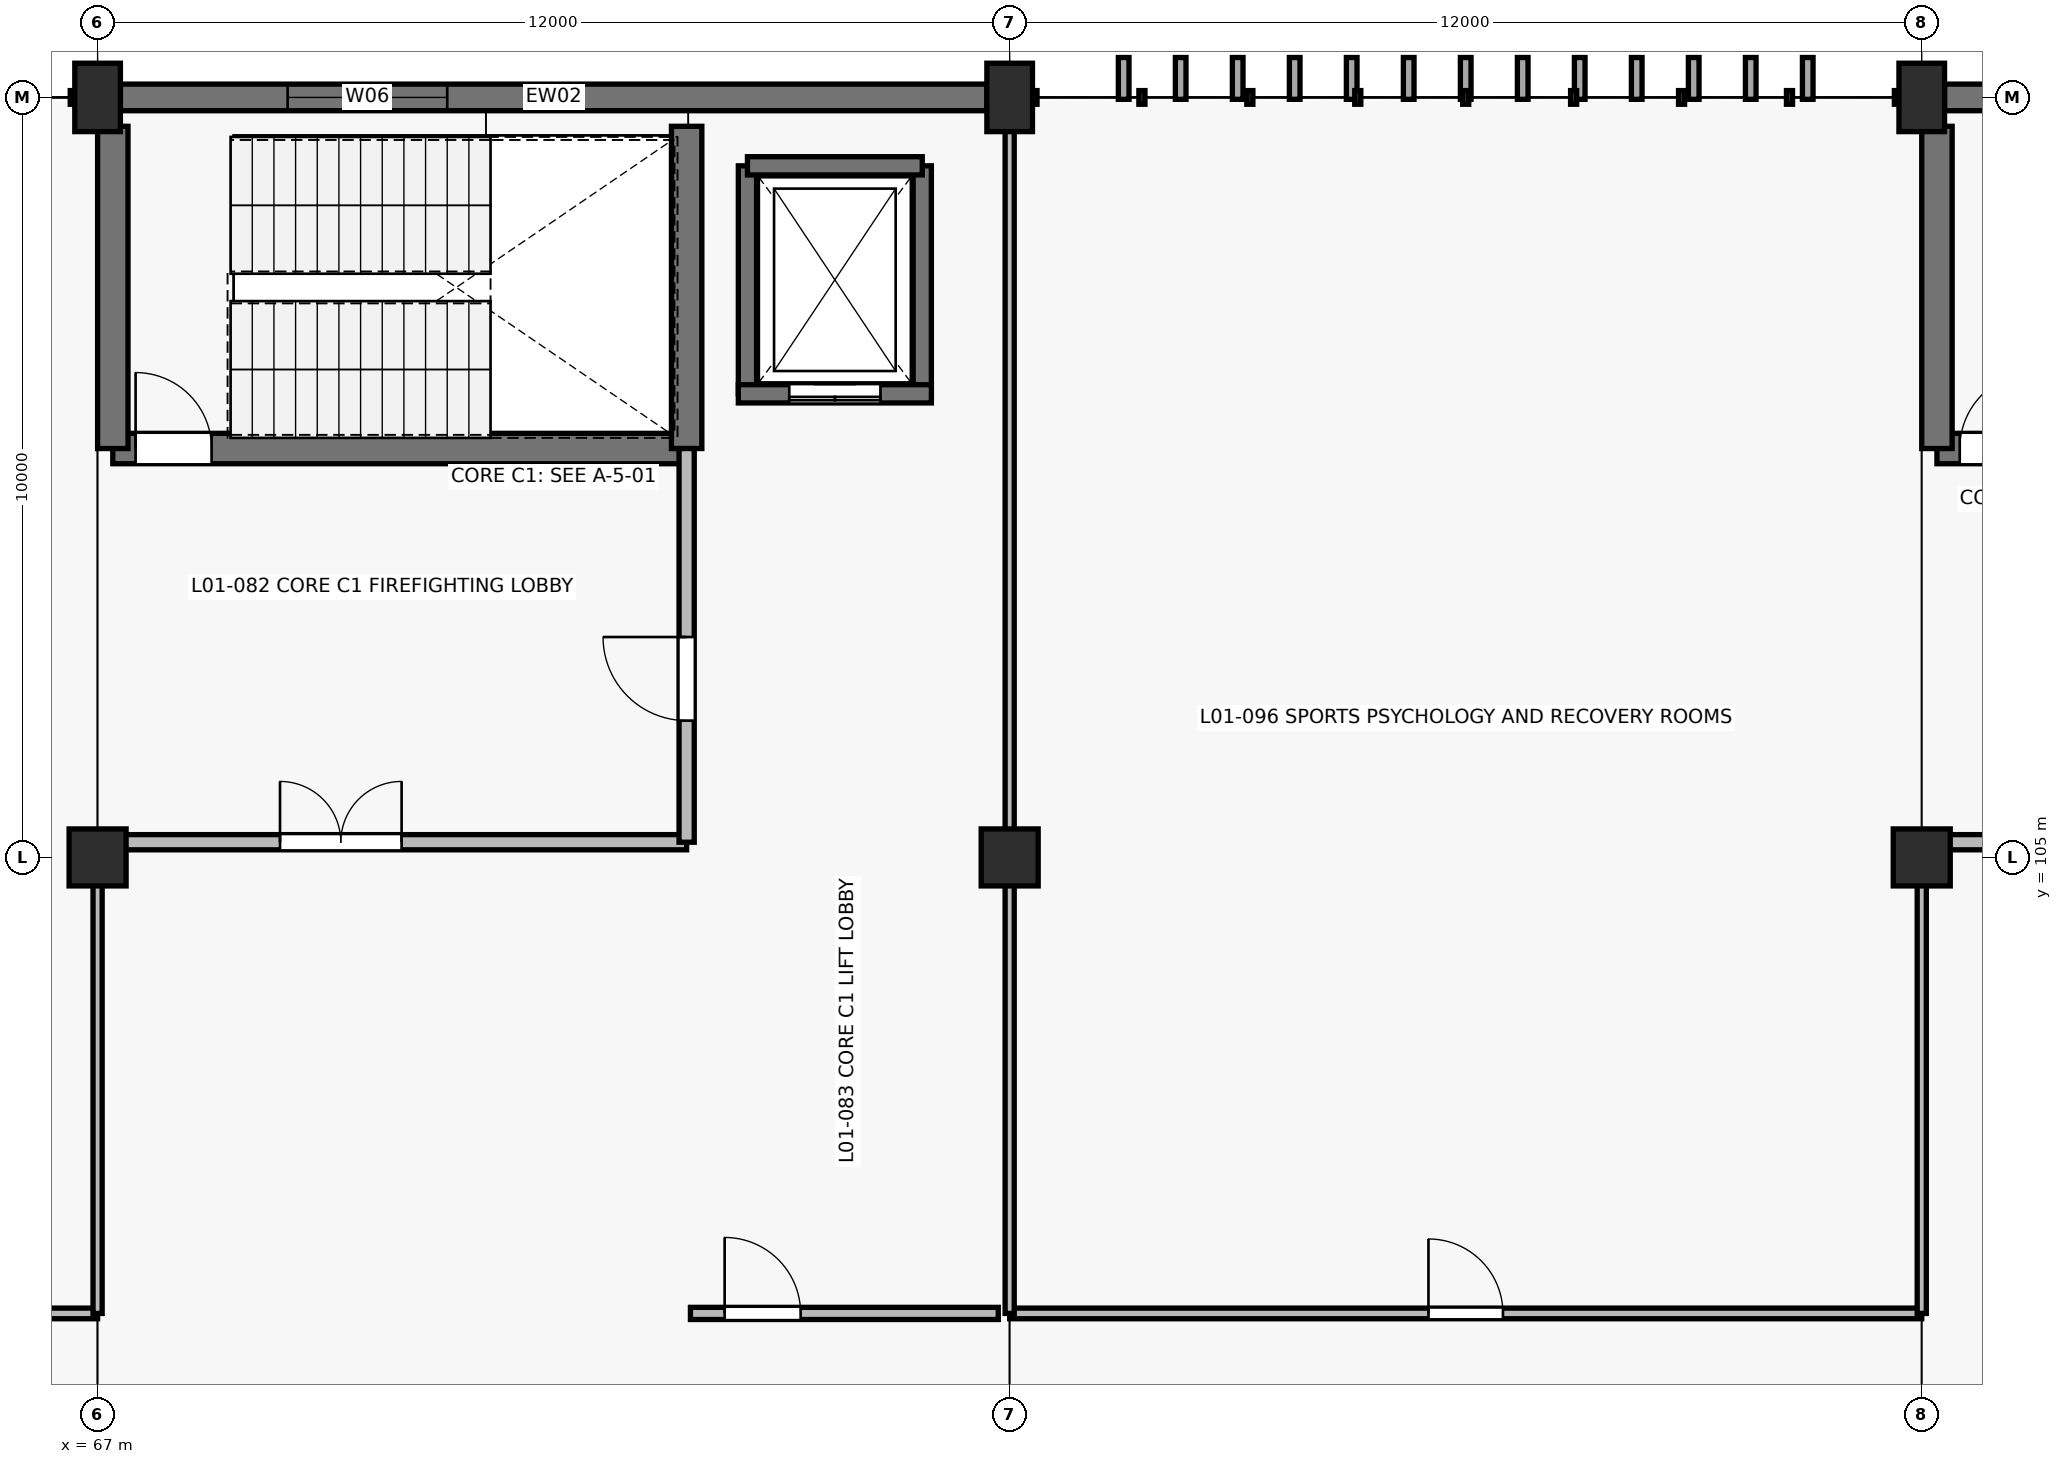
"""IFC4 building model, lengths in metres.
Left out: names, types, materials, properties, quantities, classifications, styles, units other than length and angle.
Written with IfcOpenShell. Run it as: python <this file> out.ifc"""

import sys

from ifc_helpers import new_model, si_unit, direction, frame, frame_2d, origin, origin_2d, place, context, subcontext, project, spatial, rectangle, extrude, element, fill, save


model = new_model("IFC4")
c1 = context("Model", 3, precision=1e-05, world=origin(), true_north=direction((0.0, 1.0)))
c2 = subcontext(c1, "Body", "Model", "MODEL_VIEW")
j1 = project(units=[si_unit("LENGTHUNIT", "METRE"), si_unit("PLANEANGLEUNIT", "RADIAN")], contexts=[c1])
p1 = place(None, origin())
s1 = spatial("IfcSite", under=j1, at=p1, CompositionType="ELEMENT")
p2 = place(p1, origin())
s2 = spatial("IfcBuilding", under=s1, at=p2, CompositionType="ELEMENT")
p3 = place(p2, frame((0.0, 0.0, 4.8)))
s3 = spatial("IfcBuildingStorey", under=s2, at=p3, CompositionType="ELEMENT", Elevation=4.8)
p4 = place(p3, frame((67.0, 105.0, 0.0), z_axis=(0.0, 0.0, 1.0), x_axis=(1.0, 0.0, 0.0)))
e1 = element("IfcColumn", 1, at=p4, inside=s3, PredefinedType="COLUMN", context=c2, shape_type="SweptSolid", body=[
    extrude(rectangle(XDim=0.75, YDim=0.75, at=origin_2d()), origin(), (0.0, 0.0, 1.0), 4.2),
])
p5 = place(p3, frame((67.0, 115.0, 0.0), z_axis=(0.0, 0.0, 1.0), x_axis=(1.0, 0.0, 0.0)))
e2 = element("IfcColumn", 2, at=p5, inside=s3, PredefinedType="COLUMN", context=c2, shape_type="SweptSolid", body=[
    extrude(rectangle(XDim=0.6, YDim=0.9, at=origin_2d()), origin(), (0.0, 0.0, 1.0), 4.2),
])
p6 = place(p3, frame((79.0, 105.0, 0.0), z_axis=(0.0, 0.0, 1.0), x_axis=(1.0, 0.0, 0.0)))
e3 = element("IfcColumn", 3, at=p6, inside=s3, PredefinedType="COLUMN", context=c2, shape_type="SweptSolid", body=[
    extrude(rectangle(XDim=0.75, YDim=0.75, at=origin_2d()), origin(), (0.0, 0.0, 1.0), 4.2),
])
p7 = place(p3, frame((79.0, 115.0, 0.0), z_axis=(0.0, 0.0, 1.0), x_axis=(1.0, 0.0, 0.0)))
e4 = element("IfcColumn", 4, at=p7, inside=s3, PredefinedType="COLUMN", context=c2, shape_type="SweptSolid", body=[
    extrude(rectangle(XDim=0.6, YDim=0.9, at=origin_2d()), origin(), (0.0, 0.0, 1.0), 4.2),
])
p8 = place(p3, frame((91.0, 105.0, 0.0), z_axis=(0.0, 0.0, 1.0), x_axis=(1.0, 0.0, 0.0)))
e5 = element("IfcColumn", 5, at=p8, inside=s3, PredefinedType="COLUMN", context=c2, shape_type="SweptSolid", body=[
    extrude(rectangle(XDim=0.75, YDim=0.75, at=origin_2d()), origin(), (0.0, 0.0, 1.0), 4.2),
])
p9 = place(p3, frame((91.0, 115.0, 0.0), z_axis=(0.0, 0.0, 1.0), x_axis=(1.0, 0.0, 0.0)))
e6 = element("IfcColumn", 6, at=p9, inside=s3, PredefinedType="COLUMN", context=c2, shape_type="SweptSolid", body=[
    extrude(rectangle(XDim=0.6, YDim=0.9, at=origin_2d()), origin(), (0.0, 0.0, 1.0), 4.2),
])
p10 = place(p3, frame((67.3, 115.0, 0.0), z_axis=(0.0, 0.0, 1.0), x_axis=(1.0, 0.0, 0.0)))
e7 = element("IfcWall", 7, at=p10, inside=s3, PredefinedType="SOLIDWALL", context=c2, shape_type="SweptSolid", body=[
    extrude(rectangle(XDim=11.4, YDim=0.35, at=frame_2d((5.7, 0.0))), origin(), (0.0, 0.0, 1.0), 4.2),
])
p11 = place(p10, frame((2.2, 0.0, 1.0)))
e8 = element("IfcOpeningElement", 8, at=p11, cuts=e7, PredefinedType="OPENING", context=c2, shape_type="SweptSolid", body=[
    extrude(rectangle(XDim=2.1, YDim=1.5, at=frame_2d((1.05, 0.75))), frame((0.0, 0.185, 0.0), z_axis=(0.0, -1.0, 0.0), x_axis=(1.0, 0.0, 0.0)), (0.0, 0.0, 1.0), 0.37),
])
p12 = place(p3, frame((91.3, 115.0, 0.0), z_axis=(0.0, 0.0, 1.0), x_axis=(1.0, 0.0, 0.0)))
e9 = element("IfcWall", 9, at=p12, inside=s3, PredefinedType="SOLIDWALL", context=c2, shape_type="SweptSolid", body=[
    extrude(rectangle(XDim=9.4, YDim=0.35, at=frame_2d((4.7, 0.0))), origin(), (0.0, 0.0, 1.0), 4.2),
])
p13 = place(p12, frame((2.2, 0.0, 1.0)))
e10 = element("IfcOpeningElement", 10, at=p13, cuts=e9, PredefinedType="OPENING", context=c2, shape_type="SweptSolid", body=[
    extrude(rectangle(XDim=2.7, YDim=1.5, at=frame_2d((1.35, 0.75))), frame((0.0, 0.185, 0.0), z_axis=(0.0, -1.0, 0.0), x_axis=(1.0, 0.0, 0.0)), (0.0, 0.0, 1.0), 0.37),
])
for number, where, z_axis, x_axis in (
    (11, (75.55, 111.1, 0.0), (0.0, 0.0, 1.0), (0.0, 1.0, 0.0)),
    (12, (77.85, 114.1, 0.0), (0.0, 0.0, 1.0), (0.0, -1.0, 0.0)),
):
    element("IfcWall", number, at=place(p3, frame(where, z_axis=z_axis, x_axis=x_axis)), inside=s3, PredefinedType="SHEAR", context=c2, shape_type="SweptSolid", body=[
        extrude(rectangle(XDim=3.0, YDim=0.24, at=frame_2d((1.5, 0.0))), origin(), (0.0, 0.0, 1.0), 4.2),
    ])
p14 = place(p3, frame((75.55, 114.1, 0.0), z_axis=(0.0, 0.0, 1.0), x_axis=(1.0, 0.0, 0.0)))
e13 = element("IfcWall", 13, at=p14, inside=s3, PredefinedType="SHEAR", context=c2, shape_type="SweptSolid", body=[
    extrude(rectangle(XDim=2.3, YDim=0.24, at=frame_2d((1.15, 0.0))), origin(), (0.0, 0.0, 1.0), 4.2),
])
p15 = place(p3, frame((77.97, 111.1, 0.0), z_axis=(0.0, 0.0, 1.0), x_axis=(-1.0, 0.0, 0.0)))
e14 = element("IfcWall", 14, at=p15, inside=s3, PredefinedType="SHEAR", context=c2, shape_type="SweptSolid", body=[
    extrude(rectangle(XDim=2.54, YDim=0.24, at=frame_2d((1.27, 0.0))), origin(), (0.0, 0.0, 1.0), 4.2),
])
p16 = place(p15, frame((0.67, 0.0, 0.0)))
e15 = element("IfcOpeningElement", 15, at=p16, cuts=e14, PredefinedType="OPENING", context=c2, shape_type="SweptSolid", body=[
    extrude(rectangle(XDim=1.2, YDim=2.15, at=frame_2d((0.6, 1.075))), frame((0.0, 0.13, 0.0), z_axis=(0.0, -1.0, 0.0), x_axis=(1.0, 0.0, 0.0)), (0.0, 0.0, 1.0), 0.26),
])
p17 = place(p3, frame((67.2, 110.38, 0.0), z_axis=(0.0, 0.0, 1.0), x_axis=(1.0, 0.0, 0.0)))
e16 = element("IfcWall", 16, at=p17, inside=s3, PredefinedType="SHEAR", context=c2, shape_type="SweptSolid", body=[
    extrude(rectangle(XDim=7.55, YDim=0.4, at=frame_2d((3.775, 0.0))), origin(), (0.0, 0.0, 1.0), 4.2),
])
p18 = place(p17, frame((0.3, 0.0, 0.0)))
e17 = element("IfcOpeningElement", 17, at=p18, cuts=e16, PredefinedType="OPENING", context=c2, shape_type="SweptSolid", body=[
    extrude(rectangle(XDim=1.0, YDim=2.15, at=frame_2d((0.5, 1.075))), frame((0.0, 0.21, 0.0), z_axis=(0.0, -1.0, 0.0), x_axis=(1.0, 0.0, 0.0)), (0.0, 0.0, 1.0), 0.42),
])
for number, where, z_axis, x_axis in (
    (18, (74.75, 110.38, 0.0), (0.0, 0.0, 1.0), (0.0, 1.0, 0.0)),
    (19, (67.2, 114.62, 0.0), (0.0, 0.0, 1.0), (0.0, -1.0, 0.0)),
):
    element("IfcWall", number, at=place(p3, frame(where, z_axis=z_axis, x_axis=x_axis)), inside=s3, PredefinedType="SHEAR", context=c2, shape_type="SweptSolid", body=[
        extrude(rectangle(XDim=4.24, YDim=0.4, at=frame_2d((2.12, 0.0))), origin(), (0.0, 0.0, 1.0), 4.2),
    ])
p19 = place(p3, frame((67.2, 105.2, 0.0), z_axis=(0.0, 0.0, 1.0), x_axis=(1.0, 0.0, 0.0)))
e20 = element("IfcWall", 20, at=p19, inside=s3, PredefinedType="PARTITIONING", context=c2, shape_type="SweptSolid", body=[
    extrude(rectangle(XDim=7.55, YDim=0.2, at=frame_2d((3.775, 0.0))), origin(), (0.0, 0.0, 1.0), 2.925),
])
p20 = place(p19, frame((2.2, 0.0, 0.0)))
e21 = element("IfcOpeningElement", 21, at=p20, cuts=e20, PredefinedType="OPENING", context=c2, shape_type="SweptSolid", body=[
    extrude(rectangle(XDim=1.6, YDim=2.2, at=frame_2d((0.8, 1.1))), frame((0.0, 0.11, 0.0), z_axis=(0.0, -1.0, 0.0), x_axis=(1.0, 0.0, 0.0)), (0.0, 0.0, 1.0), 0.22),
])
p21 = place(p3, frame((74.75, 105.2, 0.0), z_axis=(0.0, 0.0, 1.0), x_axis=(0.0, 1.0, 0.0)))
e22 = element("IfcWall", 22, at=p21, inside=s3, PredefinedType="PARTITIONING", context=c2, shape_type="SweptSolid", body=[
    extrude(rectangle(XDim=5.18, YDim=0.2, at=frame_2d((2.59, 0.0))), origin(), (0.0, 0.0, 1.0), 3.025),
])
p22 = place(p21, frame((1.6, 0.0, 0.0)))
e23 = element("IfcOpeningElement", 23, at=p22, cuts=e22, PredefinedType="OPENING", context=c2, shape_type="SweptSolid", body=[
    extrude(rectangle(XDim=1.1, YDim=2.15, at=frame_2d((0.55, 1.075))), frame((0.0, 0.11, 0.0), z_axis=(0.0, -1.0, 0.0), x_axis=(1.0, 0.0, 0.0)), (0.0, 0.0, 1.0), 0.22),
])
p23 = place(p3, frame((74.8, 99.0, 0.0), z_axis=(0.0, 0.0, 1.0), x_axis=(1.0, 0.0, 0.0)))
e24 = element("IfcWall", 24, at=p23, inside=s3, PredefinedType="PARTITIONING", context=c2, shape_type="SweptSolid", body=[
    extrude(rectangle(XDim=4.05, YDim=0.16, at=frame_2d((2.025, 0.0))), origin(), (0.0, 0.0, 1.0), 2.925),
])
p24 = place(p23, frame((0.45, 0.0, 0.0)))
e25 = element("IfcOpeningElement", 25, at=p24, cuts=e24, PredefinedType="OPENING", context=c2, shape_type="SweptSolid", body=[
    extrude(rectangle(XDim=1.0, YDim=2.15, at=frame_2d((0.5, 1.075))), frame((0.0, 0.09, 0.0), z_axis=(0.0, -1.0, 0.0), x_axis=(1.0, 0.0, 0.0)), (0.0, 0.0, 1.0), 0.18),
])
p25 = place(p3, frame((91.2, 110.38, 0.0), z_axis=(0.0, 0.0, 1.0), x_axis=(1.0, 0.0, 0.0)))
e26 = element("IfcWall", 26, at=p25, inside=s3, PredefinedType="SHEAR", context=c2, shape_type="SweptSolid", body=[
    extrude(rectangle(XDim=7.1, YDim=0.4, at=frame_2d((3.55, 0.0))), origin(), (0.0, 0.0, 1.0), 4.2),
])
p26 = place(p25, frame((0.3, 0.0, 0.0)))
e27 = element("IfcOpeningElement", 27, at=p26, cuts=e26, PredefinedType="OPENING", context=c2, shape_type="SweptSolid", body=[
    extrude(rectangle(XDim=1.0, YDim=2.15, at=frame_2d((0.5, 1.075))), frame((0.0, 0.21, 0.0), z_axis=(0.0, -1.0, 0.0), x_axis=(1.0, 0.0, 0.0)), (0.0, 0.0, 1.0), 0.42),
])
p27 = place(p3, frame((91.2, 114.62, 0.0), z_axis=(0.0, 0.0, 1.0), x_axis=(0.0, -1.0, 0.0)))
e28 = element("IfcWall", 28, at=p27, inside=s3, PredefinedType="SHEAR", context=c2, shape_type="SweptSolid", body=[
    extrude(rectangle(XDim=4.24, YDim=0.4, at=frame_2d((2.12, 0.0))), origin(), (0.0, 0.0, 1.0), 4.2),
])
p28 = place(p3, frame((91.2, 105.2, 0.0), z_axis=(0.0, 0.0, 1.0), x_axis=(1.0, 0.0, 0.0)))
e29 = element("IfcWall", 29, at=p28, inside=s3, PredefinedType="PARTITIONING", context=c2, shape_type="SweptSolid", body=[
    extrude(rectangle(XDim=7.1, YDim=0.2, at=frame_2d((3.55, 0.0))), origin(), (0.0, 0.0, 1.0), 2.925),
])
p29 = place(p28, frame((2.2, 0.0, 0.0)))
e30 = element("IfcOpeningElement", 30, at=p29, cuts=e29, PredefinedType="OPENING", context=c2, shape_type="SweptSolid", body=[
    extrude(rectangle(XDim=1.6, YDim=2.2, at=frame_2d((0.8, 1.1))), frame((0.0, 0.11, 0.0), z_axis=(0.0, -1.0, 0.0), x_axis=(1.0, 0.0, 0.0)), (0.0, 0.0, 1.0), 0.22),
])
p30 = place(p3, frame((43.18, 99.0, 0.0), z_axis=(0.0, 0.0, 1.0), x_axis=(1.0, 0.0, 0.0)))
e31 = element("IfcWall", 31, at=p30, inside=s3, PredefinedType="PARTITIONING", context=c2, shape_type="SweptSolid", body=[
    extrude(rectangle(XDim=23.82, YDim=0.14, at=frame_2d((11.91, 0.0))), origin(), (0.0, 0.0, 1.0), 2.925),
])
p31 = place(p30, frame((11.01, 0.0, 0.0)))
e32 = element("IfcOpeningElement", 32, at=p31, cuts=e31, PredefinedType="OPENING", context=c2, shape_type="SweptSolid", body=[
    extrude(rectangle(XDim=1.8, YDim=2.25, at=frame_2d((0.9, 1.125))), frame((0.0, 0.08, 0.0), z_axis=(0.0, -1.0, 0.0), x_axis=(1.0, 0.0, 0.0)), (0.0, 0.0, 1.0), 0.16),
])
p32 = place(p3, frame((67.0, 99.0, 0.0), z_axis=(0.0, 0.0, 1.0), x_axis=(0.0, 1.0, 0.0)))
e33 = element("IfcWall", 33, at=p32, inside=s3, PredefinedType="PARTITIONING", context=c2, shape_type="SweptSolid", body=[
    extrude(rectangle(XDim=6.2, YDim=0.12, at=frame_2d((3.1, 0.0))), origin(), (0.0, 0.0, 1.0), 2.925),
])
p33 = place(p3, frame((79.0, 99.0, 0.0), z_axis=(0.0, 0.0, 1.0), x_axis=(1.0, 0.0, 0.0)))
e34 = element("IfcWall", 34, at=p33, inside=s3, PredefinedType="PARTITIONING", context=c2, shape_type="SweptSolid", body=[
    extrude(rectangle(XDim=12.0, YDim=0.14, at=frame_2d((6.0, 0.0))), origin(), (0.0, 0.0, 1.0), 2.925),
])
p34 = place(p33, frame((5.51, 0.0, 0.0)))
e35 = element("IfcOpeningElement", 35, at=p34, cuts=e34, PredefinedType="OPENING", context=c2, shape_type="SweptSolid", body=[
    extrude(rectangle(XDim=0.98, YDim=2.1, at=frame_2d((0.49, 1.05))), frame((0.0, 0.08, 0.0), z_axis=(0.0, -1.0, 0.0), x_axis=(1.0, 0.0, 0.0)), (0.0, 0.0, 1.0), 0.16),
])
p35 = place(p3, frame((79.0, 99.0, 0.0), z_axis=(0.0, 0.0, 1.0), x_axis=(0.0, 1.0, 0.0)))
e36 = element("IfcWall", 36, at=p35, inside=s3, PredefinedType="PARTITIONING", context=c2, shape_type="SweptSolid", body=[
    extrude(rectangle(XDim=15.75, YDim=0.12, at=frame_2d((7.875, 0.0))), origin(), (0.0, 0.0, 1.0), 2.925),
])
p36 = place(p3, frame((91.0, 99.0, 0.0), z_axis=(0.0, 0.0, 1.0), x_axis=(0.0, 1.0, 0.0)))
e37 = element("IfcWall", 37, at=p36, inside=s3, PredefinedType="PARTITIONING", context=c2, shape_type="SweptSolid", body=[
    extrude(rectangle(XDim=6.2, YDim=0.12, at=frame_2d((3.1, 0.0))), origin(), (0.0, 0.0, 1.0), 2.925),
])
p37 = place(p11, origin())
e38 = element("IfcWindow", 38, at=p37, inside=s3, PartitioningType="DOUBLE_PANEL_VERTICAL", PredefinedType="WINDOW", context=c2, shape_type="SweptSolid", body=[
    extrude(rectangle(XDim=2.1, YDim=1.5, at=frame_2d((1.05, 0.75))), frame((0.0, 0.03, 0.0), z_axis=(0.0, -1.0, 0.0), x_axis=(1.0, 0.0, 0.0)), (0.0, 0.0, 1.0), 0.06),
])
fill(e8, e38)
p38 = place(p16, origin())
e39 = element("IfcDoor", 39, at=p38, inside=s3, OperationType="DOUBLE_DOOR_SLIDING", PredefinedType="USERDEFINED", context=c2, shape_type="SweptSolid", body=[
    extrude(rectangle(XDim=1.2, YDim=2.15, at=frame_2d((0.6, 1.075))), frame((0.0, 0.025, 0.0), z_axis=(0.0, -1.0, 0.0), x_axis=(1.0, 0.0, 0.0)), (0.0, 0.0, 1.0), 0.05),
])
fill(e15, e39)
p39 = place(p18, origin())
e40 = element("IfcDoor", 40, at=p39, inside=s3, OperationType="SINGLE_SWING_LEFT", PredefinedType="DOOR", context=c2, shape_type="SweptSolid", body=[
    extrude(rectangle(XDim=1.0, YDim=2.15, at=frame_2d((0.5, 1.075))), frame((0.0, 0.025, 0.0), z_axis=(0.0, -1.0, 0.0), x_axis=(1.0, 0.0, 0.0)), (0.0, 0.0, 1.0), 0.05),
])
fill(e17, e40)
p40 = place(p20, origin())
e41 = element("IfcDoor", 41, at=p40, inside=s3, OperationType="DOUBLE_DOOR_SINGLE_SWING", PredefinedType="DOOR", context=c2, shape_type="SweptSolid", body=[
    extrude(rectangle(XDim=1.6, YDim=2.2, at=frame_2d((0.8, 1.1))), frame((0.0, 0.025, 0.0), z_axis=(0.0, -1.0, 0.0), x_axis=(1.0, 0.0, 0.0)), (0.0, 0.0, 1.0), 0.05),
])
fill(e21, e41)
p41 = place(p22, origin())
e42 = element("IfcDoor", 42, at=p41, inside=s3, OperationType="SINGLE_SWING_RIGHT", PredefinedType="DOOR", context=c2, shape_type="SweptSolid", body=[
    extrude(rectangle(XDim=1.1, YDim=2.15, at=frame_2d((0.55, 1.075))), frame((0.0, 0.025, 0.0), z_axis=(0.0, -1.0, 0.0), x_axis=(1.0, 0.0, 0.0)), (0.0, 0.0, 1.0), 0.05),
])
fill(e23, e42)
p42 = place(p24, origin())
e43 = element("IfcDoor", 43, at=p42, inside=s3, OperationType="SINGLE_SWING_LEFT", PredefinedType="DOOR", context=c2, shape_type="SweptSolid", body=[
    extrude(rectangle(XDim=1.0, YDim=2.15, at=frame_2d((0.5, 1.075))), frame((0.0, 0.025, 0.0), z_axis=(0.0, -1.0, 0.0), x_axis=(1.0, 0.0, 0.0)), (0.0, 0.0, 1.0), 0.05),
])
fill(e25, e43)
p43 = place(p26, origin())
e44 = element("IfcDoor", 44, at=p43, inside=s3, OperationType="SINGLE_SWING_RIGHT", PredefinedType="DOOR", context=c2, shape_type="SweptSolid", body=[
    extrude(rectangle(XDim=1.0, YDim=2.15, at=frame_2d((0.5, 1.075))), frame((0.0, 0.025, 0.0), z_axis=(0.0, -1.0, 0.0), x_axis=(1.0, 0.0, 0.0)), (0.0, 0.0, 1.0), 0.05),
])
fill(e27, e44)
p44 = place(p34, origin())
e45 = element("IfcDoor", 45, at=p44, inside=s3, OperationType="SINGLE_SWING_LEFT", PredefinedType="DOOR", context=c2, shape_type="SweptSolid", body=[
    extrude(rectangle(XDim=0.98, YDim=2.1, at=frame_2d((0.49, 1.05))), frame((0.0, 0.025, 0.0), z_axis=(0.0, -1.0, 0.0), x_axis=(1.0, 0.0, 0.0)), (0.0, 0.0, 1.0), 0.05),
])
fill(e35, e45)
save(model, sys.argv[1])
